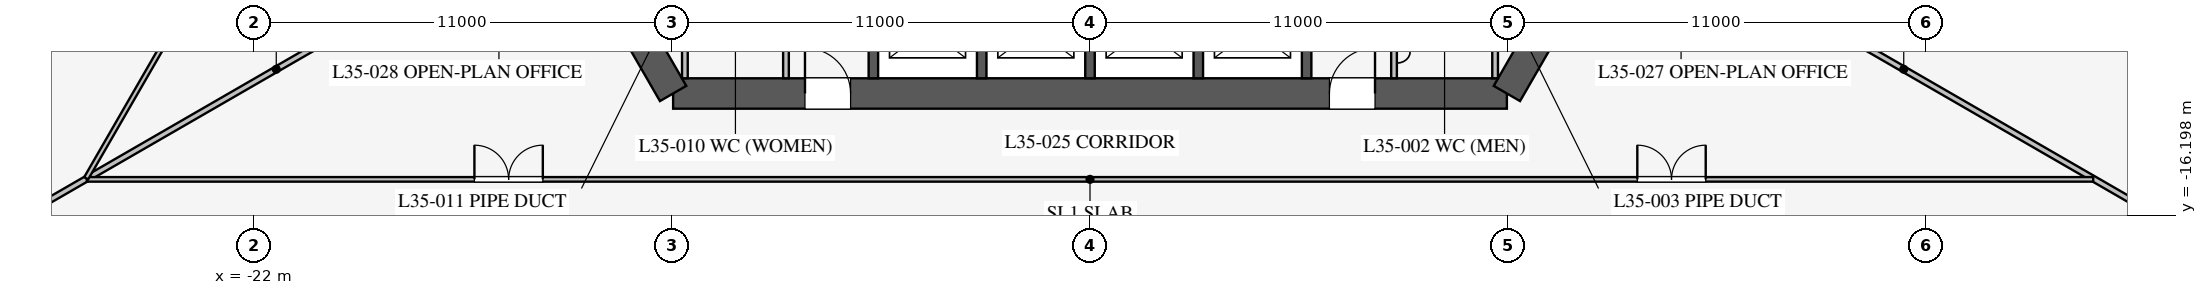
"""IFC4 building model, lengths in metres.
Left out: names, types, materials, properties, quantities, classifications, styles, units other than length and angle.
Written with IfcOpenShell. Run it as: python <this file> out.ifc"""

import sys

from ifc_helpers import new_model, si_unit, direction, frame, frame_2d, origin, place, context, subcontext, project, spatial, rectangle, extrude, element, fill, save


model = new_model("IFC4")
c1 = context("Model", 3, precision=1e-05, world=origin(), true_north=direction((0.0, 1.0)))
c2 = subcontext(c1, "Body", "Model", "MODEL_VIEW")
j1 = project(units=[si_unit("LENGTHUNIT", "METRE"), si_unit("PLANEANGLEUNIT", "RADIAN")], contexts=[c1])
p1 = place(None, origin())
s1 = spatial("IfcSite", under=j1, at=p1, CompositionType="ELEMENT")
p2 = place(p1, origin())
s2 = spatial("IfcBuilding", under=s1, at=p2, CompositionType="ELEMENT")
p3 = place(p2, frame((0.0, 0.0, 153.5)))
s3 = spatial("IfcBuildingStorey", under=s2, at=p3, CompositionType="ELEMENT", Elevation=153.5)
p4 = place(p3, frame((-10.97, -13.0, 0.0), z_axis=(0.0, 0.0, 1.0), x_axis=(1.0, 0.0, 0.0)))
e1 = element("IfcWall", 1, at=p4, inside=s3, PredefinedType="SHEAR", context=c2, shape_type="SweptSolid", body=[
    extrude(rectangle(XDim=21.939, YDim=0.8, at=frame_2d((10.97, 0.0))), origin(), (0.0, 0.0, 1.0), 4.2),
])
p5 = place(p4, frame((17.27, 0.0, 0.0)))
e2 = element("IfcOpeningElement", 2, at=p5, cuts=e1, PredefinedType="OPENING", context=c2, shape_type="SweptSolid", body=[
    extrude(rectangle(XDim=1.2, YDim=2.1, at=frame_2d((0.6, 1.05))), frame((0.0, 0.41, 0.0), z_axis=(0.0, -1.0, 0.0), x_axis=(1.0, 0.0, 0.0)), (0.0, 0.0, 1.0), 0.82),
])
p6 = place(p4, frame((3.47, 0.0, 0.0)))
e3 = element("IfcOpeningElement", 3, at=p6, cuts=e1, PredefinedType="OPENING", context=c2, shape_type="SweptSolid", body=[
    extrude(rectangle(XDim=1.2, YDim=2.1, at=frame_2d((0.6, 1.05))), frame((0.0, 0.41, 0.0), z_axis=(0.0, -1.0, 0.0), x_axis=(1.0, 0.0, 0.0)), (0.0, 0.0, 1.0), 0.82),
])
for number, where, z_axis, x_axis in (
    (4, (10.97, -13.0, 0.0), (0.0, 0.0, 1.0), (0.5, 0.866, 0.0)),
    (5, (-16.743, -3.0, 0.0), (0.0, 0.0, 1.0), (0.5, -0.866, 0.0)),
):
    element("IfcWall", number, at=place(p3, frame(where, z_axis=z_axis, x_axis=x_axis)), inside=s3, PredefinedType="SHEAR", context=c2, shape_type="SweptSolid", body=[
        extrude(rectangle(XDim=11.547, YDim=0.8, at=frame_2d((5.773, 0.0))), origin(), (0.0, 0.0, 1.0), 4.2),
    ])
for number, where, z_axis, x_axis in (
    (6, (-5.7, -10.025, 0.0), (0.0, 0.0, 1.0), (0.0, -1.0, 0.0)),
    (7, (-2.85, -10.025, 0.0), (0.0, 0.0, 1.0), (0.0, -1.0, 0.0)),
    (8, (0.0, -10.025, 0.0), (0.0, 0.0, 1.0), (0.0, -1.0, 0.0)),
    (9, (2.85, -10.025, 0.0), (0.0, 0.0, 1.0), (0.0, -1.0, 0.0)),
    (10, (5.7, -10.025, 0.0), (0.0, 0.0, 1.0), (0.0, -1.0, 0.0)),
):
    element("IfcWall", number, at=place(p3, frame(where, z_axis=z_axis, x_axis=x_axis)), inside=s3, PredefinedType="SHEAR", context=c2, shape_type="SweptSolid", body=[
        extrude(rectangle(XDim=2.575, YDim=0.25, at=frame_2d((1.288, 0.0))), origin(), (0.0, 0.0, 1.0), 4.2),
    ])
p7 = place(p3, frame((8.0, -7.5, 0.0), z_axis=(0.0, 0.0, 1.0), x_axis=(0.0, -1.0, 0.0)))
e11 = element("IfcWall", 11, at=p7, inside=s3, PredefinedType="PARTITIONING", context=c2, shape_type="SweptSolid", body=[
    extrude(rectangle(XDim=5.1, YDim=0.15, at=frame_2d((2.55, 0.0))), origin(), (0.0, 0.0, 1.0), 4.0),
])
p8 = place(p7, frame((1.3, 0.0, 0.0)))
e12 = element("IfcOpeningElement", 12, at=p8, cuts=e11, PredefinedType="OPENING", context=c2, shape_type="SweptSolid", body=[
    extrude(rectangle(XDim=0.9, YDim=2.1, at=frame_2d((0.45, 1.05))), frame((0.0, 0.085, 0.0), z_axis=(0.0, -1.0, 0.0), x_axis=(1.0, 0.0, 0.0)), (0.0, 0.0, 1.0), 0.17),
])
p9 = place(p3, frame((-8.0, -7.5, 0.0), z_axis=(0.0, 0.0, 1.0), x_axis=(0.0, -1.0, 0.0)))
e13 = element("IfcWall", 13, at=p9, inside=s3, PredefinedType="PARTITIONING", context=c2, shape_type="SweptSolid", body=[
    extrude(rectangle(XDim=5.1, YDim=0.15, at=frame_2d((2.55, 0.0))), origin(), (0.0, 0.0, 1.0), 4.0),
])
p10 = place(p9, frame((2.6, 0.0, 0.0)))
e14 = element("IfcOpeningElement", 14, at=p10, cuts=e13, PredefinedType="OPENING", context=c2, shape_type="SweptSolid", body=[
    extrude(rectangle(XDim=0.9, YDim=2.1, at=frame_2d((0.45, 1.05))), frame((0.0, 0.085, 0.0), z_axis=(0.0, -1.0, 0.0), x_axis=(1.0, 0.0, 0.0)), (0.0, 0.0, 1.0), 0.17),
])
for number, where, z_axis, x_axis in (
    (15, (10.66, -8.5, 0.0), (0.0, 0.0, 1.0), (0.0, -1.0, 0.0)),
    (16, (-10.66, -8.5, 0.0), (0.0, 0.0, 1.0), (0.0, -1.0, 0.0)),
):
    element("IfcWall", number, at=place(p3, frame(where, z_axis=z_axis, x_axis=x_axis)), inside=s3, PredefinedType="PARTITIONING", context=c2, shape_type="SweptSolid", body=[
        extrude(rectangle(XDim=4.1, YDim=0.15, at=frame_2d((2.05, 0.0))), origin(), (0.0, 0.0, 1.0), 4.0),
    ])
for number, where, z_axis, x_axis in (
    (17, (14.203, -8.2, 0.0), (0.0, 0.0, 1.0), (0.866, -0.5, 0.0)),
    (18, (-14.203, -8.2, 0.0), (0.0, 0.0, 1.0), (-0.866, -0.5, 0.0)),
):
    element("IfcWall", number, at=place(p3, frame(where, z_axis=z_axis, x_axis=x_axis)), inside=s3, PredefinedType="PARTITIONING", context=c2, shape_type="SweptSolid", body=[
        extrude(rectangle(XDim=16.65, YDim=0.15, at=frame_2d((8.325, 0.0))), origin(), (0.0, 0.0, 1.0), 2.3),
    ])
p11 = place(p3, frame((-26.398, -15.26, 0.0), z_axis=(0.0, 0.0, 1.0), x_axis=(1.0, 0.0, 0.0)))
e19 = element("IfcWall", 19, at=p11, inside=s3, PredefinedType="PARTITIONING", context=c2, shape_type="SweptSolid", body=[
    extrude(rectangle(XDim=52.796, YDim=0.12, at=frame_2d((26.398, 0.0))), origin(), (0.0, 0.0, 1.0), 2.9),
])
p12 = place(p11, frame((10.2, 0.0, 0.15)))
e20 = element("IfcOpeningElement", 20, at=p12, cuts=e19, PredefinedType="OPENING", context=c2, shape_type="SweptSolid", body=[
    extrude(rectangle(XDim=1.8, YDim=2.1, at=frame_2d((0.9, 1.05))), frame((0.0, 0.07, 0.0), z_axis=(0.0, -1.0, 0.0), x_axis=(1.0, 0.0, 0.0)), (0.0, 0.0, 1.0), 0.14),
])
p13 = place(p11, frame((40.8, 0.0, 0.15)))
e21 = element("IfcOpeningElement", 21, at=p13, cuts=e19, PredefinedType="OPENING", context=c2, shape_type="SweptSolid", body=[
    extrude(rectangle(XDim=1.8, YDim=2.1, at=frame_2d((0.9, 1.05))), frame((0.0, 0.07, 0.0), z_axis=(0.0, -1.0, 0.0), x_axis=(1.0, 0.0, 0.0)), (0.0, 0.0, 1.0), 0.14),
])
p14 = place(p3, frame((-0.016, 30.491, 0.0), z_axis=(0.0, 0.0, 1.0), x_axis=(-0.50000091641, -0.866024874695, 0.0)))
e22 = element("IfcWall", 22, at=p14, inside=s3, PredefinedType="PARTITIONING", context=c2, shape_type="SweptSolid", body=[
    extrude(rectangle(XDim=52.796, YDim=0.12, at=frame_2d((26.398, 0.0))), origin(), (0.0, 0.0, 1.0), 2.9),
])
p15 = place(p14, frame((10.2, 0.0, 0.15)))
e23 = element("IfcOpeningElement", 23, at=p15, cuts=e22, PredefinedType="OPENING", context=c2, shape_type="SweptSolid", body=[
    extrude(rectangle(XDim=1.8, YDim=2.1, at=frame_2d((0.9, 1.05))), frame((0.0, 0.07, 0.0), z_axis=(0.0, -1.0, 0.0), x_axis=(1.0, 0.0, 0.0)), (0.0, 0.0, 1.0), 0.14),
])
p16 = place(p14, frame((40.8, 0.0, 0.15)))
e24 = element("IfcOpeningElement", 24, at=p16, cuts=e22, PredefinedType="OPENING", context=c2, shape_type="SweptSolid", body=[
    extrude(rectangle(XDim=1.8, YDim=2.1, at=frame_2d((0.9, 1.05))), frame((0.0, 0.07, 0.0), z_axis=(0.0, -1.0, 0.0), x_axis=(1.0, 0.0, 0.0)), (0.0, 0.0, 1.0), 0.14),
])
p17 = place(p5, origin())
e25 = element("IfcDoor", 25, at=p17, inside=s3, OperationType="SINGLE_SWING_RIGHT", PredefinedType="DOOR", context=c2, shape_type="SweptSolid", body=[
    extrude(rectangle(XDim=1.2, YDim=2.1, at=frame_2d((0.6, 1.05))), frame((0.0, 0.025, 0.0), z_axis=(0.0, -1.0, 0.0), x_axis=(1.0, 0.0, 0.0)), (0.0, 0.0, 1.0), 0.05),
])
fill(e2, e25)
p18 = place(p6, origin())
e26 = element("IfcDoor", 26, at=p18, inside=s3, OperationType="SINGLE_SWING_LEFT", PredefinedType="DOOR", context=c2, shape_type="SweptSolid", body=[
    extrude(rectangle(XDim=1.2, YDim=2.1, at=frame_2d((0.6, 1.05))), frame((0.0, 0.025, 0.0), z_axis=(0.0, -1.0, 0.0), x_axis=(1.0, 0.0, 0.0)), (0.0, 0.0, 1.0), 0.05),
])
fill(e3, e26)
p19 = place(p12, origin())
e27 = element("IfcDoor", 27, at=p19, inside=s3, OperationType="DOUBLE_DOOR_SINGLE_SWING", PredefinedType="DOOR", context=c2, shape_type="SweptSolid", body=[
    extrude(rectangle(XDim=1.8, YDim=2.1, at=frame_2d((0.9, 1.05))), frame((0.0, 0.025, 0.0), z_axis=(0.0, -1.0, 0.0), x_axis=(1.0, 0.0, 0.0)), (0.0, 0.0, 1.0), 0.05),
])
fill(e20, e27)
p20 = place(p13, origin())
e28 = element("IfcDoor", 28, at=p20, inside=s3, OperationType="DOUBLE_DOOR_SINGLE_SWING", PredefinedType="DOOR", context=c2, shape_type="SweptSolid", body=[
    extrude(rectangle(XDim=1.8, YDim=2.1, at=frame_2d((0.9, 1.05))), frame((0.0, 0.025, 0.0), z_axis=(0.0, -1.0, 0.0), x_axis=(1.0, 0.0, 0.0)), (0.0, 0.0, 1.0), 0.05),
])
fill(e21, e28)
save(model, sys.argv[1])
